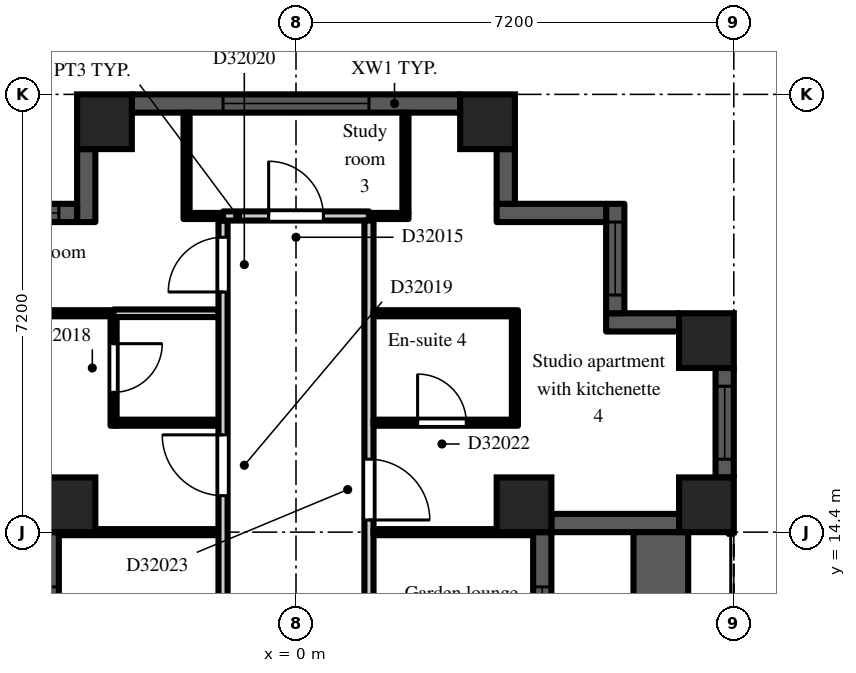
"""IFC4 building model, lengths in metres.
Left out: names, types, materials, properties, quantities, classifications, styles, units other than length and angle.
Written with IfcOpenShell. Run it as: python <this file> out.ifc"""

import sys

from ifc_helpers import new_model, si_unit, direction, frame, frame_2d, origin, origin_2d, place, context, subcontext, project, spatial, rectangle, extrude, element, fill, save


model = new_model("IFC4")
c1 = context("Model", 3, precision=1e-05, world=origin(), true_north=direction((0.0, 1.0)))
c2 = subcontext(c1, "Body", "Model", "MODEL_VIEW")
j1 = project(units=[si_unit("LENGTHUNIT", "METRE"), si_unit("PLANEANGLEUNIT", "RADIAN")], contexts=[c1])
p1 = place(None, origin())
s1 = spatial("IfcSite", under=j1, at=p1, CompositionType="ELEMENT")
p2 = place(p1, origin())
s2 = spatial("IfcBuilding", under=s1, at=p2, CompositionType="ELEMENT")
p3 = place(p2, frame((0.0, 0.0, 225.9)))
s3 = spatial("IfcBuildingStorey", under=s2, at=p3, CompositionType="ELEMENT", Elevation=225.9)
for number, where, z_axis, x_axis in (
    (1, (-3.75, 14.85, 0.0), (0.0, 0.0, 1.0), (1.0, 0.0, 0.0)),
    (2, (-3.15, 21.15, 0.0), (0.0, 0.0, 1.0), (1.0, 0.0, 0.0)),
    (3, (3.15, 21.15, 0.0), (0.0, 0.0, 1.0), (1.0, 0.0, 0.0)),
    (4, (3.75, 14.85, 0.0), (0.0, 0.0, 1.0), (1.0, 0.0, 0.0)),
    (5, (6.75, 14.85, 0.0), (0.0, 0.0, 1.0), (1.0, 0.0, 0.0)),
    (6, (6.75, 17.55, 0.0), (0.0, 0.0, 1.0), (1.0, 0.0, 0.0)),
):
    element("IfcColumn", number, at=place(p3, frame(where, z_axis=z_axis, x_axis=x_axis)), inside=s3, PredefinedType="COLUMN", context=c2, shape_type="SweptSolid", body=[
        extrude(rectangle(XDim=0.9, YDim=0.9, at=origin_2d()), origin(), (0.0, 0.0, 1.0), 3.0),
    ])
p4 = place(p3, frame((4.05, 7.2, 0.0), z_axis=(0.0, 0.0, 1.0), x_axis=(0.0, 1.0, 0.0)))
e7 = element("IfcWall", 7, at=p4, inside=s3, PredefinedType="SOLIDWALL", context=c2, shape_type="SweptSolid", body=[
    extrude(rectangle(XDim=7.2, YDim=0.3, at=frame_2d((3.6, 0.0))), origin(), (0.0, 0.0, 1.0), 2.3),
])
p5 = place(p4, frame((3.0, 0.0, 0.0)))
e8 = element("IfcOpeningElement", 8, at=p5, cuts=e7, PredefinedType="OPENING", context=c2, shape_type="SweptSolid", body=[
    extrude(rectangle(XDim=1.2, YDim=2.05, at=frame_2d((0.6, 1.025))), frame((0.0, 0.16, 0.0), z_axis=(0.0, -1.0, 0.0), x_axis=(1.0, 0.0, 0.0)), (0.0, 0.0, 1.0), 0.32),
])
p6 = place(p4, frame((0.9, 0.0, 0.2)))
e9 = element("IfcOpeningElement", 9, at=p6, cuts=e7, PredefinedType="OPENING", context=c2, shape_type="SweptSolid", body=[
    extrude(rectangle(XDim=1.8, YDim=1.85, at=frame_2d((0.9, 0.925))), frame((0.0, 0.16, 0.0), z_axis=(0.0, -1.0, 0.0), x_axis=(1.0, 0.0, 0.0)), (0.0, 0.0, 1.0), 0.32),
])
p7 = place(p4, frame((4.5, 0.0, 0.2)))
e10 = element("IfcOpeningElement", 10, at=p7, cuts=e7, PredefinedType="OPENING", context=c2, shape_type="SweptSolid", body=[
    extrude(rectangle(XDim=1.8, YDim=1.85, at=frame_2d((0.9, 0.925))), frame((0.0, 0.16, 0.0), z_axis=(0.0, -1.0, 0.0), x_axis=(1.0, 0.0, 0.0)), (0.0, 0.0, 1.0), 0.32),
])
p8 = place(p3, frame((4.2, 14.55, 0.0), z_axis=(0.0, 0.0, 1.0), x_axis=(1.0, 0.0, 0.0)))
e11 = element("IfcWall", 11, at=p8, inside=s3, PredefinedType="SOLIDWALL", context=c2, shape_type="SweptSolid", body=[
    extrude(rectangle(XDim=2.1, YDim=0.3, at=frame_2d((1.05, 0.0))), origin(), (0.0, 0.0, 1.0), 2.3),
])
p9 = place(p3, frame((7.05, 15.3, 0.0), z_axis=(0.0, 0.0, 1.0), x_axis=(0.0, 1.0, 0.0)))
e12 = element("IfcWall", 12, at=p9, inside=s3, PredefinedType="SOLIDWALL", context=c2, shape_type="SweptSolid", body=[
    extrude(rectangle(XDim=1.8, YDim=0.3, at=frame_2d((0.9, 0.0))), origin(), (0.0, 0.0, 1.0), 2.3),
])
p10 = place(p9, frame((0.3, 0.0, 0.2)))
e13 = element("IfcOpeningElement", 13, at=p10, cuts=e12, PredefinedType="OPENING", context=c2, shape_type="SweptSolid", body=[
    extrude(rectangle(XDim=1.2, YDim=1.85, at=frame_2d((0.6, 0.925))), frame((0.0, 0.16, 0.0), z_axis=(0.0, -1.0, 0.0), x_axis=(1.0, 0.0, 0.0)), (0.0, 0.0, 1.0), 0.32),
])
p11 = place(p3, frame((6.3, 17.85, 0.0), z_axis=(0.0, 0.0, 1.0), x_axis=(-1.0, 0.0, 0.0)))
e14 = element("IfcWall", 14, at=p11, inside=s3, PredefinedType="SOLIDWALL", context=c2, shape_type="SweptSolid", body=[
    extrude(rectangle(XDim=1.2, YDim=0.3, at=frame_2d((0.6, 0.0))), origin(), (0.0, 0.0, 1.0), 2.6),
])
p12 = place(p3, frame((5.25, 18.0, 0.0), z_axis=(0.0, 0.0, 1.0), x_axis=(0.0, 1.0, 0.0)))
e15 = element("IfcWall", 15, at=p12, inside=s3, PredefinedType="SOLIDWALL", context=c2, shape_type="SweptSolid", body=[
    extrude(rectangle(XDim=1.8, YDim=0.3, at=frame_2d((0.9, 0.0))), origin(), (0.0, 0.0, 1.0), 2.6),
])
p13 = place(p12, frame((0.3, 0.0, 0.2)))
e16 = element("IfcOpeningElement", 16, at=p13, cuts=e15, PredefinedType="OPENING", context=c2, shape_type="SweptSolid", body=[
    extrude(rectangle(XDim=1.2, YDim=1.85, at=frame_2d((0.6, 0.925))), frame((0.0, 0.16, 0.0), z_axis=(0.0, -1.0, 0.0), x_axis=(1.0, 0.0, 0.0)), (0.0, 0.0, 1.0), 0.32),
])
p14 = place(p3, frame((5.1, 19.65, 0.0), z_axis=(0.0, 0.0, 1.0), x_axis=(-1.0, 0.0, 0.0)))
e17 = element("IfcWall", 17, at=p14, inside=s3, PredefinedType="SOLIDWALL", context=c2, shape_type="SweptSolid", body=[
    extrude(rectangle(XDim=1.8, YDim=0.3, at=frame_2d((0.9, 0.0))), origin(), (0.0, 0.0, 1.0), 2.6),
])
p15 = place(p3, frame((3.45, 19.8, 0.0), z_axis=(0.0, 0.0, 1.0), x_axis=(0.0, 1.0, 0.0)))
e18 = element("IfcWall", 18, at=p15, inside=s3, PredefinedType="SOLIDWALL", context=c2, shape_type="SweptSolid", body=[
    extrude(rectangle(XDim=0.9, YDim=0.3, at=frame_2d((0.45, 0.0))), origin(), (0.0, 0.0, 1.0), 2.6),
])
p16 = place(p3, frame((2.7, 21.45, 0.0), z_axis=(0.0, 0.0, 1.0), x_axis=(-1.0, 0.0, 0.0)))
e19 = element("IfcWall", 19, at=p16, inside=s3, PredefinedType="SOLIDWALL", context=c2, shape_type="SweptSolid", body=[
    extrude(rectangle(XDim=5.4, YDim=0.3, at=frame_2d((2.7, 0.0))), origin(), (0.0, 0.0, 1.0), 2.3),
])
p17 = place(p16, frame((1.5, 0.0, 0.2)))
e20 = element("IfcOpeningElement", 20, at=p17, cuts=e19, PredefinedType="OPENING", context=c2, shape_type="SweptSolid", body=[
    extrude(rectangle(XDim=2.4, YDim=1.85, at=frame_2d((1.2, 0.925))), frame((0.0, 0.16, 0.0), z_axis=(0.0, -1.0, 0.0), x_axis=(1.0, 0.0, 0.0)), (0.0, 0.0, 1.0), 0.32),
])
p18 = place(p3, frame((-3.45, 20.7, 0.0), z_axis=(0.0, 0.0, 1.0), x_axis=(0.0, -1.0, 0.0)))
e21 = element("IfcWall", 21, at=p18, inside=s3, PredefinedType="SOLIDWALL", context=c2, shape_type="SweptSolid", body=[
    extrude(rectangle(XDim=1.2, YDim=0.3, at=frame_2d((0.6, 0.0))), origin(), (0.0, 0.0, 1.0), 2.6),
])
p19 = place(p3, frame((-3.6, 19.65, 0.0), z_axis=(0.0, 0.0, 1.0), x_axis=(-1.0, 0.0, 0.0)))
e22 = element("IfcWall", 22, at=p19, inside=s3, PredefinedType="SOLIDWALL", context=c2, shape_type="SweptSolid", body=[
    extrude(rectangle(XDim=1.8, YDim=0.3, at=frame_2d((0.9, 0.0))), origin(), (0.0, 0.0, 1.0), 2.6),
])
p20 = place(p19, frame((0.3, 0.0, 0.2)))
e23 = element("IfcOpeningElement", 23, at=p20, cuts=e22, PredefinedType="OPENING", context=c2, shape_type="SweptSolid", body=[
    extrude(rectangle(XDim=1.2, YDim=1.85, at=frame_2d((0.6, 0.925))), frame((0.0, 0.16, 0.0), z_axis=(0.0, -1.0, 0.0), x_axis=(1.0, 0.0, 0.0)), (0.0, 0.0, 1.0), 0.32),
])
p21 = place(p3, frame((-4.05, 14.4, 0.0), z_axis=(0.0, 0.0, 1.0), x_axis=(0.0, -1.0, 0.0)))
e24 = element("IfcWall", 24, at=p21, inside=s3, PredefinedType="SOLIDWALL", context=c2, shape_type="SweptSolid", body=[
    extrude(rectangle(XDim=7.2, YDim=0.3, at=frame_2d((3.6, 0.0))), origin(), (0.0, 0.0, 1.0), 2.3),
])
p22 = place(p21, frame((3.0, 0.0, 0.0)))
e25 = element("IfcOpeningElement", 25, at=p22, cuts=e24, PredefinedType="OPENING", context=c2, shape_type="SweptSolid", body=[
    extrude(rectangle(XDim=1.2, YDim=2.05, at=frame_2d((0.6, 1.025))), frame((0.0, 0.16, 0.0), z_axis=(0.0, -1.0, 0.0), x_axis=(1.0, 0.0, 0.0)), (0.0, 0.0, 1.0), 0.32),
])
p23 = place(p21, frame((0.9, 0.0, 0.2)))
e26 = element("IfcOpeningElement", 26, at=p23, cuts=e24, PredefinedType="OPENING", context=c2, shape_type="SweptSolid", body=[
    extrude(rectangle(XDim=1.8, YDim=1.85, at=frame_2d((0.9, 0.925))), frame((0.0, 0.16, 0.0), z_axis=(0.0, -1.0, 0.0), x_axis=(1.0, 0.0, 0.0)), (0.0, 0.0, 1.0), 0.32),
])
p24 = place(p21, frame((4.5, 0.0, 0.2)))
e27 = element("IfcOpeningElement", 27, at=p24, cuts=e24, PredefinedType="OPENING", context=c2, shape_type="SweptSolid", body=[
    extrude(rectangle(XDim=1.8, YDim=1.85, at=frame_2d((0.9, 0.925))), frame((0.0, 0.16, 0.0), z_axis=(0.0, -1.0, 0.0), x_axis=(1.0, 0.0, 0.0)), (0.0, 0.0, 1.0), 0.32),
])
p25 = place(p3, frame((6.0, 7.2, 0.0), z_axis=(0.0, 0.0, 1.0), x_axis=(0.0, 1.0, 0.0)))
e28 = element("IfcWall", 28, at=p25, inside=s3, PredefinedType="PARAPET", context=c2, shape_type="SweptSolid", body=[
    extrude(rectangle(XDim=7.2, YDim=0.9, at=frame_2d((3.6, 0.0))), origin(), (0.0, 0.0, 1.0), 0.8),
])
p26 = place(p3, frame((-5.1, 18.0, 0.0), z_axis=(0.0, 0.0, 1.0), x_axis=(1.0, 0.0, 0.0)))
e29 = element("IfcWall", 29, at=p26, inside=s3, PredefinedType="PARTITIONING", context=c2, shape_type="SweptSolid", body=[
    extrude(rectangle(XDim=2.1, YDim=0.1, at=frame_2d((1.05, 0.0))), origin(), (0.0, 0.0, 1.0), 2.6),
])
p27 = place(p3, frame((-3.9, 14.4, 0.0), z_axis=(0.0, 0.0, 1.0), x_axis=(1.0, 0.0, 0.0)))
e30 = element("IfcWall", 30, at=p27, inside=s3, PredefinedType="PARTITIONING", context=c2, shape_type="SweptSolid", body=[
    extrude(rectangle(XDim=2.625, YDim=0.1, at=frame_2d((1.312, 0.0))), origin(), (0.0, 0.0, 1.0), 2.6),
])
p28 = place(p3, frame((-3.0, 16.15, 0.0), z_axis=(0.0, 0.0, 1.0), x_axis=(0.0, 1.0, 0.0)))
e31 = element("IfcWall", 31, at=p28, inside=s3, PredefinedType="PARTITIONING", context=c2, shape_type="SweptSolid", body=[
    extrude(rectangle(XDim=1.788, YDim=0.1, at=frame_2d((0.894, 0.0))), origin(), (0.0, 0.0, 1.0), 2.6),
])
p29 = place(p28, frame((0.55, 0.0, 0.0)))
e32 = element("IfcOpeningElement", 32, at=p29, cuts=e31, PredefinedType="OPENING", context=c2, shape_type="SweptSolid", body=[
    extrude(rectangle(XDim=0.8, YDim=2.1, at=frame_2d((0.4, 1.05))), frame((0.0, 0.06, 0.0), z_axis=(0.0, -1.0, 0.0), x_axis=(1.0, 0.0, 0.0)), (0.0, 0.0, 1.0), 0.12),
])
p30 = place(p3, frame((-2.95, 16.2, 0.0), z_axis=(0.0, 0.0, 1.0), x_axis=(1.0, 0.0, 0.0)))
e33 = element("IfcWall", 33, at=p30, inside=s3, PredefinedType="PARTITIONING", context=c2, shape_type="SweptSolid", body=[
    extrude(rectangle(XDim=1.675, YDim=0.1, at=frame_2d((0.837, 0.0))), origin(), (0.0, 0.0, 1.0), 2.6),
])
p31 = place(p3, frame((-3.0, 18.0, 0.0), z_axis=(0.0, 0.0, 1.0), x_axis=(1.0, 0.0, 0.0)))
e34 = element("IfcWall", 34, at=p31, inside=s3, PredefinedType="PARTITIONING", context=c2, shape_type="SweptSolid", body=[
    extrude(rectangle(XDim=1.725, YDim=0.125, at=frame_2d((0.863, 0.0))), origin(), (0.0, 0.0, 1.0), 2.6),
])
p32 = place(p3, frame((-1.8, 19.55, 0.0), z_axis=(0.0, 0.0, 1.0), x_axis=(0.0, 1.0, 0.0)))
e35 = element("IfcWall", 35, at=p32, inside=s3, PredefinedType="PARTITIONING", context=c2, shape_type="SweptSolid", body=[
    extrude(rectangle(XDim=1.75, YDim=0.1, at=frame_2d((0.875, 0.0))), origin(), (0.0, 0.0, 1.0), 2.6),
])
p33 = place(p3, frame((-1.75, 19.6, 0.0), z_axis=(0.0, 0.0, 1.0), x_axis=(1.0, 0.0, 0.0)))
e36 = element("IfcWall", 36, at=p33, inside=s3, PredefinedType="PARTITIONING", context=c2, shape_type="SweptSolid", body=[
    extrude(rectangle(XDim=0.55, YDim=0.1, at=frame_2d((0.275, 0.0))), origin(), (0.0, 0.0, 1.0), 2.6),
])
p34 = place(p3, frame((-1.2, 1.275, 0.0), z_axis=(0.0, 0.0, 1.0), x_axis=(0.0, 1.0, 0.0)))
e37 = element("IfcWall", 37, at=p34, inside=s3, PredefinedType="PARTITIONING", context=c2, shape_type="SweptSolid", body=[
    extrude(rectangle(XDim=18.25, YDim=0.15, at=frame_2d((9.125, 0.0))), origin(), (0.0, 0.0, 1.0), 2.6),
])
p35 = place(p34, frame((0.675, 0.0, 0.0)))
e38 = element("IfcOpeningElement", 38, at=p35, cuts=e37, PredefinedType="OPENING", context=c2, shape_type="SweptSolid", body=[
    extrude(rectangle(XDim=0.9, YDim=2.1, at=frame_2d((0.45, 1.05))), frame((0.0, 0.085, 0.0), z_axis=(0.0, -1.0, 0.0), x_axis=(1.0, 0.0, 0.0)), (0.0, 0.0, 1.0), 0.17),
])
p36 = place(p34, frame((3.675, 0.0, 0.0)))
e39 = element("IfcOpeningElement", 39, at=p36, cuts=e37, PredefinedType="OPENING", context=c2, shape_type="SweptSolid", body=[
    extrude(rectangle(XDim=0.9, YDim=2.1, at=frame_2d((0.45, 1.05))), frame((0.0, 0.085, 0.0), z_axis=(0.0, -1.0, 0.0), x_axis=(1.0, 0.0, 0.0)), (0.0, 0.0, 1.0), 0.17),
])
p37 = place(p34, frame((6.875, 0.0, 0.0)))
e40 = element("IfcOpeningElement", 40, at=p37, cuts=e37, PredefinedType="OPENING", context=c2, shape_type="SweptSolid", body=[
    extrude(rectangle(XDim=0.9, YDim=2.1, at=frame_2d((0.45, 1.05))), frame((0.0, 0.085, 0.0), z_axis=(0.0, -1.0, 0.0), x_axis=(1.0, 0.0, 0.0)), (0.0, 0.0, 1.0), 0.17),
])
p38 = place(p34, frame((10.475, 0.0, 0.0)))
e41 = element("IfcOpeningElement", 41, at=p38, cuts=e37, PredefinedType="OPENING", context=c2, shape_type="SweptSolid", body=[
    extrude(rectangle(XDim=0.9, YDim=2.1, at=frame_2d((0.45, 1.05))), frame((0.0, 0.085, 0.0), z_axis=(0.0, -1.0, 0.0), x_axis=(1.0, 0.0, 0.0)), (0.0, 0.0, 1.0), 0.17),
])
p39 = place(p34, frame((13.725, 0.0, 0.0)))
e42 = element("IfcOpeningElement", 42, at=p39, cuts=e37, PredefinedType="OPENING", context=c2, shape_type="SweptSolid", body=[
    extrude(rectangle(XDim=1.0, YDim=2.1, at=frame_2d((0.5, 1.05))), frame((0.0, 0.085, 0.0), z_axis=(0.0, -1.0, 0.0), x_axis=(1.0, 0.0, 0.0)), (0.0, 0.0, 1.0), 0.17),
])
p40 = place(p34, frame((17.075, 0.0, 0.0)))
e43 = element("IfcOpeningElement", 43, at=p40, cuts=e37, PredefinedType="OPENING", context=c2, shape_type="SweptSolid", body=[
    extrude(rectangle(XDim=0.9, YDim=2.1, at=frame_2d((0.45, 1.05))), frame((0.0, 0.085, 0.0), z_axis=(0.0, -1.0, 0.0), x_axis=(1.0, 0.0, 0.0)), (0.0, 0.0, 1.0), 0.17),
])
p41 = place(p3, frame((-1.2, 19.6, 0.0), z_axis=(0.0, 0.0, 1.0), x_axis=(1.0, 0.0, 0.0)))
e44 = element("IfcWall", 44, at=p41, inside=s3, PredefinedType="PARTITIONING", context=c2, shape_type="SweptSolid", body=[
    extrude(rectangle(XDim=2.4, YDim=0.15, at=frame_2d((1.2, 0.0))), origin(), (0.0, 0.0, 1.0), 2.6),
])
p42 = place(p41, frame((0.75, 0.0, 0.0)))
e45 = element("IfcOpeningElement", 45, at=p42, cuts=e44, PredefinedType="OPENING", context=c2, shape_type="SweptSolid", body=[
    extrude(rectangle(XDim=0.9, YDim=2.1, at=frame_2d((0.45, 1.05))), frame((0.0, 0.085, 0.0), z_axis=(0.0, -1.0, 0.0), x_axis=(1.0, 0.0, 0.0)), (0.0, 0.0, 1.0), 0.17),
])
p43 = place(p3, frame((1.2, 1.125, 0.0), z_axis=(0.0, 0.0, 1.0), x_axis=(0.0, 1.0, 0.0)))
e46 = element("IfcWall", 46, at=p43, inside=s3, PredefinedType="PARTITIONING", context=c2, shape_type="SweptSolid", body=[
    extrude(rectangle(XDim=18.4, YDim=0.15, at=frame_2d((9.2, 0.0))), origin(), (0.0, 0.0, 1.0), 2.6),
])
p44 = place(p43, frame((2.625, 0.0, 0.0)))
e47 = element("IfcOpeningElement", 47, at=p44, cuts=e46, PredefinedType="OPENING", context=c2, shape_type="SweptSolid", body=[
    extrude(rectangle(XDim=0.9, YDim=2.1, at=frame_2d((0.45, 1.05))), frame((0.0, 0.085, 0.0), z_axis=(0.0, -1.0, 0.0), x_axis=(1.0, 0.0, 0.0)), (0.0, 0.0, 1.0), 0.17),
])
p45 = place(p43, frame((7.425, 0.0, 0.0)))
e48 = element("IfcOpeningElement", 48, at=p45, cuts=e46, PredefinedType="OPENING", context=c2, shape_type="SweptSolid", body=[
    extrude(rectangle(XDim=0.9, YDim=2.1, at=frame_2d((0.45, 1.05))), frame((0.0, 0.085, 0.0), z_axis=(0.0, -1.0, 0.0), x_axis=(1.0, 0.0, 0.0)), (0.0, 0.0, 1.0), 0.17),
])
p46 = place(p43, frame((13.475, 0.0, 0.0)))
e49 = element("IfcOpeningElement", 49, at=p46, cuts=e46, PredefinedType="OPENING", context=c2, shape_type="SweptSolid", body=[
    extrude(rectangle(XDim=1.0, YDim=2.1, at=frame_2d((0.5, 1.05))), frame((0.0, 0.085, 0.0), z_axis=(0.0, -1.0, 0.0), x_axis=(1.0, 0.0, 0.0)), (0.0, 0.0, 1.0), 0.17),
])
p47 = place(p3, frame((1.275, 14.4, 0.0), z_axis=(0.0, 0.0, 1.0), x_axis=(1.0, 0.0, 0.0)))
e50 = element("IfcWall", 50, at=p47, inside=s3, PredefinedType="PARTITIONING", context=c2, shape_type="SweptSolid", body=[
    extrude(rectangle(XDim=2.625, YDim=0.1, at=frame_2d((1.312, 0.0))), origin(), (0.0, 0.0, 1.0), 2.6),
])
p48 = place(p3, frame((1.275, 16.2, 0.0), z_axis=(0.0, 0.0, 1.0), x_axis=(1.0, 0.0, 0.0)))
e51 = element("IfcWall", 51, at=p48, inside=s3, PredefinedType="PARTITIONING", context=c2, shape_type="SweptSolid", body=[
    extrude(rectangle(XDim=2.375, YDim=0.1, at=frame_2d((1.188, 0.0))), origin(), (0.0, 0.0, 1.0), 2.6),
])
p49 = place(p48, frame((0.725, 0.0, 0.0)))
e52 = element("IfcOpeningElement", 52, at=p49, cuts=e51, PredefinedType="OPENING", context=c2, shape_type="SweptSolid", body=[
    extrude(rectangle(XDim=0.8, YDim=2.1, at=frame_2d((0.4, 1.05))), frame((0.0, 0.06, 0.0), z_axis=(0.0, -1.0, 0.0), x_axis=(1.0, 0.0, 0.0)), (0.0, 0.0, 1.0), 0.12),
])
p50 = place(p3, frame((1.275, 18.0, 0.0), z_axis=(0.0, 0.0, 1.0), x_axis=(1.0, 0.0, 0.0)))
e53 = element("IfcWall", 53, at=p50, inside=s3, PredefinedType="PARTITIONING", context=c2, shape_type="SweptSolid", body=[
    extrude(rectangle(XDim=2.375, YDim=0.1, at=frame_2d((1.188, 0.0))), origin(), (0.0, 0.0, 1.0), 2.6),
])
p51 = place(p3, frame((1.2, 19.6, 0.0), z_axis=(0.0, 0.0, 1.0), x_axis=(1.0, 0.0, 0.0)))
e54 = element("IfcWall", 54, at=p51, inside=s3, PredefinedType="PARTITIONING", context=c2, shape_type="SweptSolid", body=[
    extrude(rectangle(XDim=0.65, YDim=0.1, at=frame_2d((0.325, 0.0))), origin(), (0.0, 0.0, 1.0), 2.6),
])
p52 = place(p3, frame((1.8, 19.65, 0.0), z_axis=(0.0, 0.0, 1.0), x_axis=(0.0, 1.0, 0.0)))
e55 = element("IfcWall", 55, at=p52, inside=s3, PredefinedType="PARTITIONING", context=c2, shape_type="SweptSolid", body=[
    extrude(rectangle(XDim=1.65, YDim=0.1, at=frame_2d((0.825, 0.0))), origin(), (0.0, 0.0, 1.0), 2.6),
])
p53 = place(p3, frame((3.6, 16.25, 0.0), z_axis=(0.0, 0.0, 1.0), x_axis=(0.0, 1.0, 0.0)))
e56 = element("IfcWall", 56, at=p53, inside=s3, PredefinedType="PARTITIONING", context=c2, shape_type="SweptSolid", body=[
    extrude(rectangle(XDim=1.7, YDim=0.1, at=frame_2d((0.85, 0.0))), origin(), (0.0, 0.0, 1.0), 2.6),
])
p54 = place(p7, origin())
e57 = element("IfcWindow", 57, at=p54, inside=s3, PartitioningType="SINGLE_PANEL", PredefinedType="WINDOW", context=c2, shape_type="SweptSolid", body=[
    extrude(rectangle(XDim=1.8, YDim=1.85, at=frame_2d((0.9, 0.925))), frame((0.0, 0.03, 0.0), z_axis=(0.0, -1.0, 0.0), x_axis=(1.0, 0.0, 0.0)), (0.0, 0.0, 1.0), 0.06),
])
fill(e10, e57)
p55 = place(p10, origin())
e58 = element("IfcWindow", 58, at=p55, inside=s3, PartitioningType="SINGLE_PANEL", PredefinedType="WINDOW", context=c2, shape_type="SweptSolid", body=[
    extrude(rectangle(XDim=1.2, YDim=1.85, at=frame_2d((0.6, 0.925))), frame((0.0, 0.03, 0.0), z_axis=(0.0, -1.0, 0.0), x_axis=(1.0, 0.0, 0.0)), (0.0, 0.0, 1.0), 0.06),
])
fill(e13, e58)
p56 = place(p13, origin())
e59 = element("IfcWindow", 59, at=p56, inside=s3, PartitioningType="SINGLE_PANEL", PredefinedType="WINDOW", context=c2, shape_type="SweptSolid", body=[
    extrude(rectangle(XDim=1.2, YDim=1.85, at=frame_2d((0.6, 0.925))), frame((0.0, 0.03, 0.0), z_axis=(0.0, -1.0, 0.0), x_axis=(1.0, 0.0, 0.0)), (0.0, 0.0, 1.0), 0.06),
])
fill(e16, e59)
p57 = place(p17, origin())
e60 = element("IfcWindow", 60, at=p57, inside=s3, PartitioningType="SINGLE_PANEL", PredefinedType="WINDOW", context=c2, shape_type="SweptSolid", body=[
    extrude(rectangle(XDim=2.4, YDim=1.85, at=frame_2d((1.2, 0.925))), frame((0.0, 0.03, 0.0), z_axis=(0.0, -1.0, 0.0), x_axis=(1.0, 0.0, 0.0)), (0.0, 0.0, 1.0), 0.06),
])
fill(e20, e60)
p58 = place(p20, origin())
e61 = element("IfcWindow", 61, at=p58, inside=s3, PartitioningType="SINGLE_PANEL", PredefinedType="WINDOW", context=c2, shape_type="SweptSolid", body=[
    extrude(rectangle(XDim=1.2, YDim=1.85, at=frame_2d((0.6, 0.925))), frame((0.0, 0.03, 0.0), z_axis=(0.0, -1.0, 0.0), x_axis=(1.0, 0.0, 0.0)), (0.0, 0.0, 1.0), 0.06),
])
fill(e23, e61)
p59 = place(p42, origin())
e62 = element("IfcDoor", 62, at=p59, inside=s3, OperationType="SINGLE_SWING_LEFT", PredefinedType="DOOR", context=c2, shape_type="SweptSolid", body=[
    extrude(rectangle(XDim=0.9, YDim=2.1, at=frame_2d((0.45, 1.05))), frame((0.0, 0.025, 0.0), z_axis=(0.0, -1.0, 0.0), x_axis=(1.0, 0.0, 0.0)), (0.0, 0.0, 1.0), 0.05),
])
fill(e45, e62)
p60 = place(p29, frame((0.8, 0.0, 0.0), z_axis=(0.0, 0.0, 1.0), x_axis=(-1.0, 0.0, 0.0)))
e63 = element("IfcDoor", 63, at=p60, inside=s3, OperationType="SINGLE_SWING_LEFT", PredefinedType="DOOR", context=c2, shape_type="SweptSolid", body=[
    extrude(rectangle(XDim=0.8, YDim=2.1, at=frame_2d((0.4, 1.05))), frame((0.0, 0.025, 0.0), z_axis=(0.0, -1.0, 0.0), x_axis=(1.0, 0.0, 0.0)), (0.0, 0.0, 1.0), 0.05),
])
fill(e32, e63)
p61 = place(p39, origin())
e64 = element("IfcDoor", 64, at=p61, inside=s3, OperationType="SINGLE_SWING_RIGHT", PredefinedType="DOOR", context=c2, shape_type="SweptSolid", body=[
    extrude(rectangle(XDim=1.0, YDim=2.1, at=frame_2d((0.5, 1.05))), frame((0.0, 0.025, 0.0), z_axis=(0.0, -1.0, 0.0), x_axis=(1.0, 0.0, 0.0)), (0.0, 0.0, 1.0), 0.05),
])
fill(e42, e64)
p62 = place(p40, origin())
e65 = element("IfcDoor", 65, at=p62, inside=s3, OperationType="SINGLE_SWING_LEFT", PredefinedType="DOOR", context=c2, shape_type="SweptSolid", body=[
    extrude(rectangle(XDim=0.9, YDim=2.1, at=frame_2d((0.45, 1.05))), frame((0.0, 0.025, 0.0), z_axis=(0.0, -1.0, 0.0), x_axis=(1.0, 0.0, 0.0)), (0.0, 0.0, 1.0), 0.05),
])
fill(e43, e65)
p63 = place(p49, origin())
e66 = element("IfcDoor", 66, at=p63, inside=s3, OperationType="SINGLE_SWING_LEFT", PredefinedType="DOOR", context=c2, shape_type="SweptSolid", body=[
    extrude(rectangle(XDim=0.8, YDim=2.1, at=frame_2d((0.4, 1.05))), frame((0.0, 0.025, 0.0), z_axis=(0.0, -1.0, 0.0), x_axis=(1.0, 0.0, 0.0)), (0.0, 0.0, 1.0), 0.05),
])
fill(e52, e66)
p64 = place(p46, frame((1.0, 0.0, 0.0), z_axis=(0.0, 0.0, 1.0), x_axis=(-1.0, 0.0, 0.0)))
e67 = element("IfcDoor", 67, at=p64, inside=s3, OperationType="SINGLE_SWING_RIGHT", PredefinedType="DOOR", context=c2, shape_type="SweptSolid", body=[
    extrude(rectangle(XDim=1.0, YDim=2.1, at=frame_2d((0.5, 1.05))), frame((0.0, 0.025, 0.0), z_axis=(0.0, -1.0, 0.0), x_axis=(1.0, 0.0, 0.0)), (0.0, 0.0, 1.0), 0.05),
])
fill(e49, e67)
save(model, sys.argv[1])
